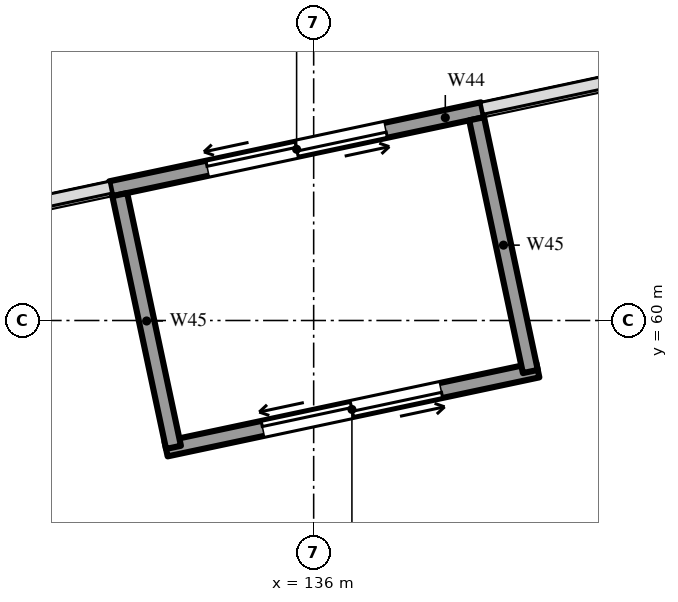
"""IFC4 building model, lengths in metres.
Left out: names, types, materials, properties, quantities, classifications, styles, units other than length and angle.
Written with IfcOpenShell. Run it as: python <this file> out.ifc"""

import sys

from ifc_helpers import new_model, si_unit, direction, frame, frame_2d, origin, place, context, subcontext, project, spatial, rectangle, extrude, element, fill, save


model = new_model("IFC4")
c1 = context("Model", 3, precision=1e-05, world=origin(), true_north=direction((0.0, 1.0)))
c2 = subcontext(c1, "Body", "Model", "MODEL_VIEW")
j1 = project(units=[si_unit("LENGTHUNIT", "METRE"), si_unit("PLANEANGLEUNIT", "RADIAN")], contexts=[c1])
p1 = place(None, origin())
s1 = spatial("IfcSite", under=j1, at=p1, CompositionType="ELEMENT")
p2 = place(p1, origin())
s2 = spatial("IfcBuilding", under=s1, at=p2, CompositionType="ELEMENT")
p3 = place(p2, origin())
s3 = spatial("IfcBuildingStorey", under=s2, at=p3, CompositionType="ELEMENT", Elevation=0.0)
p4 = place(p3, frame((133.33, 61.733, 0.0), z_axis=(0.0, 0.0, 1.0), x_axis=(0.978149046495, 0.207904888932, 0.0)))
e1 = element("IfcWall", 1, at=p4, inside=s3, PredefinedType="SOLIDWALL", context=c2, shape_type="SweptSolid", body=[
    extrude(rectangle(XDim=5.0, YDim=0.2, at=frame_2d((2.5, 0.0))), origin(), (0.0, 0.0, 1.0), 6.05),
])
p5 = place(p4, frame((1.3, 0.0, 0.0)))
e2 = element("IfcOpeningElement", 2, at=p5, cuts=e1, PredefinedType="OPENING", context=c2, shape_type="SweptSolid", body=[
    extrude(rectangle(XDim=2.4, YDim=2.4, at=frame_2d((1.2, 1.2))), frame((0.0, 0.11, 0.0), z_axis=(0.0, -1.0, 0.0), x_axis=(1.0, 0.0, 0.0)), (0.0, 0.0, 1.0), 0.22),
])
p6 = place(p3, frame((134.058, 58.31, 0.0), z_axis=(0.0, 0.0, 1.0), x_axis=(0.978149046495, 0.207904888932, 0.0)))
e3 = element("IfcWall", 3, at=p6, inside=s3, PredefinedType="SOLIDWALL", context=c2, shape_type="SweptSolid", body=[
    extrude(rectangle(XDim=5.0, YDim=0.2, at=frame_2d((2.5, 0.0))), origin(), (0.0, 0.0, 1.0), 6.05),
])
p7 = place(p6, frame((1.3, 0.0, 0.0)))
e4 = element("IfcOpeningElement", 4, at=p7, cuts=e3, PredefinedType="OPENING", context=c2, shape_type="SweptSolid", body=[
    extrude(rectangle(XDim=2.4, YDim=2.4, at=frame_2d((1.2, 1.2))), frame((0.0, 0.11, 0.0), z_axis=(0.0, -1.0, 0.0), x_axis=(1.0, 0.0, 0.0)), (0.0, 0.0, 1.0), 0.22),
])
for number, where, z_axis, x_axis in (
    (5, (133.449, 61.656, 0.0), (0.0, 0.0, 1.0), (0.208, -0.978, 0.0)),
    (6, (138.144, 62.654, 0.0), (0.0, 0.0, 1.0), (0.208, -0.978, 0.0)),
):
    element("IfcWall", number, at=place(p3, frame(where, z_axis=z_axis, x_axis=x_axis)), inside=s3, PredefinedType="SOLIDWALL", context=c2, shape_type="SweptSolid", body=[
        extrude(rectangle(XDim=3.4, YDim=0.2, at=frame_2d((1.7, 0.0))), origin(), (0.0, 0.0, 1.0), 6.05),
    ])
p8 = place(p5, origin())
e7 = element("IfcDoor", 7, at=p8, inside=s3, OperationType="DOUBLE_DOOR_SLIDING", PredefinedType="DOOR", context=c2, shape_type="SweptSolid", body=[
    extrude(rectangle(XDim=2.4, YDim=2.4, at=frame_2d((1.2, 1.2))), frame((0.0, 0.025, 0.0), z_axis=(0.0, -1.0, 0.0), x_axis=(1.0, 0.0, 0.0)), (0.0, 0.0, 1.0), 0.05),
])
fill(e2, e7)
p9 = place(p7, frame((2.4, 0.0, 0.0), z_axis=(0.0, 0.0, 1.0), x_axis=(-1.0, 0.0, 0.0)))
e8 = element("IfcDoor", 8, at=p9, inside=s3, OperationType="DOUBLE_DOOR_SLIDING", PredefinedType="DOOR", context=c2, shape_type="SweptSolid", body=[
    extrude(rectangle(XDim=2.4, YDim=2.4, at=frame_2d((1.2, 1.2))), frame((0.0, 0.025, 0.0), z_axis=(0.0, -1.0, 0.0), x_axis=(1.0, 0.0, 0.0)), (0.0, 0.0, 1.0), 0.05),
])
fill(e4, e8)
save(model, sys.argv[1])
